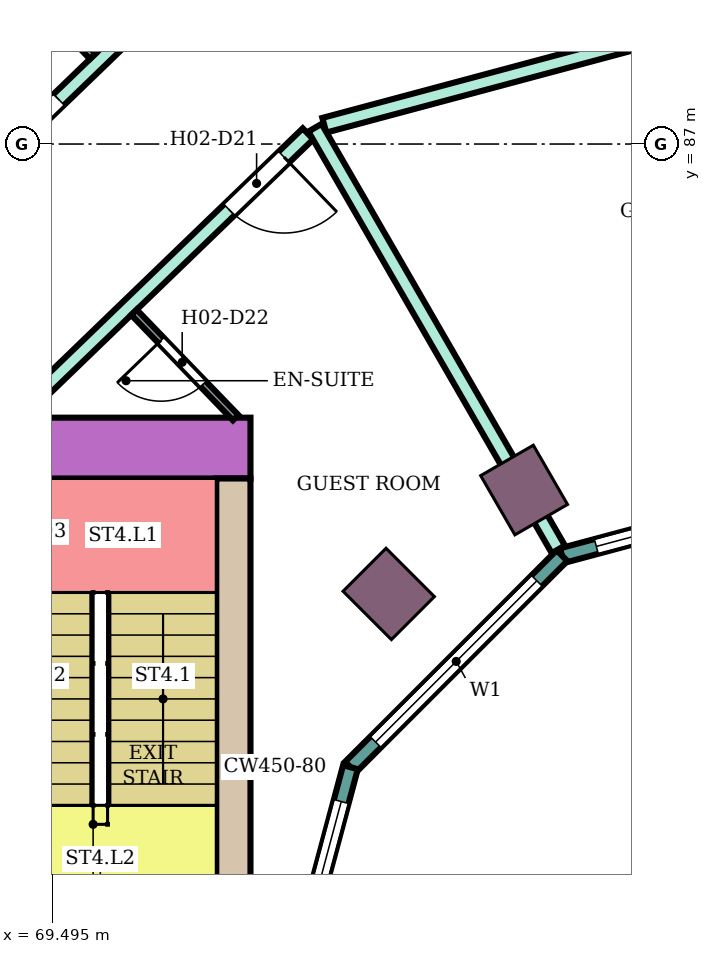
"""IFC4 building model, lengths in metres.
Left out: names, types, materials, properties, quantities, classifications, styles, units other than length and angle.
Written with IfcOpenShell. Run it as: python <this file> out.ifc"""

import sys

from ifc_helpers import new_model, si_unit, direction, frame, frame_2d, origin, origin_2d, place, context, subcontext, project, spatial, rectangle, extrude, element, fill, save


model = new_model("IFC4")
c1 = context("Model", 3, precision=1e-05, world=origin(), true_north=direction((0.0, 1.0)))
c2 = subcontext(c1, "Body", "Model", "MODEL_VIEW")
j1 = project(units=[si_unit("LENGTHUNIT", "METRE"), si_unit("PLANEANGLEUNIT", "RADIAN")], contexts=[c1])
p1 = place(None, origin())
s1 = spatial("IfcSite", under=j1, at=p1, CompositionType="ELEMENT")
p2 = place(p1, origin())
s2 = spatial("IfcBuilding", under=s1, at=p2, CompositionType="ELEMENT")
p3 = place(p2, frame((0.0, 0.0, 40.2)))
s3 = spatial("IfcBuildingStorey", under=s2, at=p3, CompositionType="ELEMENT", Elevation=40.2)
for number, where, z_axis, x_axis in (
    (1, (75.7, 82.448, 0.0), (0.0, 0.0, 1.0), (-0.5, 0.866, 0.0)),
    (2, (73.919, 81.081, 0.0), (0.0, 0.0, 1.0), (-0.707, 0.707, 0.0)),
):
    element("IfcColumn", number, at=place(p3, frame(where, z_axis=z_axis, x_axis=x_axis)), inside=s3, PredefinedType="COLUMN", context=c2, shape_type="SweptSolid", body=[
        extrude(rectangle(XDim=0.9, YDim=0.8, at=origin_2d()), origin(), (0.0, 0.0, 1.0), 3.8),
    ])
p4 = place(p3, frame((72.1, 83.0, 0.0), z_axis=(0.0, 0.0, 1.0), x_axis=(-1.0, 0.0, 0.0)))
e3 = element("IfcWall", 3, at=p4, inside=s3, PredefinedType="SHEAR", context=c2, shape_type="SweptSolid", body=[
    extrude(rectangle(XDim=14.7, YDim=0.8, at=frame_2d((7.35, 0.0))), origin(), (0.0, 0.0, 1.0), 3.48),
])
p5 = place(p4, frame((4.2, 0.0, 0.0)))
e4 = element("IfcOpeningElement", 4, at=p5, cuts=e3, PredefinedType="OPENING", context=c2, shape_type="SweptSolid", body=[
    extrude(rectangle(XDim=2.4, YDim=2.4, at=frame_2d((1.2, 1.2))), frame((0.0, 0.41, 0.0), z_axis=(0.0, -1.0, 0.0), x_axis=(1.0, 0.0, 0.0)), (0.0, 0.0, 1.0), 0.82),
])
p6 = place(p3, frame((71.875, 82.6, 0.0), z_axis=(0.0, 0.0, 1.0), x_axis=(0.0, -1.0, 0.0)))
e5 = element("IfcWall", 5, at=p6, inside=s3, PredefinedType="SHEAR", context=c2, shape_type="SweptSolid", body=[
    extrude(rectangle(XDim=7.6, YDim=0.45, at=frame_2d((3.8, 0.0))), origin(), (0.0, 0.0, 1.0), 3.48),
])
p7 = place(p3, frame((80.0, 82.604, 0.0), z_axis=(0.0, 0.0, 1.0), x_axis=(-0.965933654434, -0.258789828301, 0.0)))
e6 = element("IfcWall", 6, at=p7, inside=s3, PredefinedType="NOTDEFINED", context=c2, shape_type="SweptSolid", body=[
    extrude(rectangle(XDim=3.936, YDim=0.2, at=frame_2d((1.968, 0.0))), origin(), (0.0, 0.0, 1.0), 3.8),
])
p8 = place(p7, frame((0.468, 0.0, 0.9)))
e7 = element("IfcOpeningElement", 7, at=p8, cuts=e6, PredefinedType="OPENING", context=c2, shape_type="SweptSolid", body=[
    extrude(rectangle(XDim=3.0, YDim=2.3, at=frame_2d((1.5, 1.15))), frame((0.0, 0.11, 0.0), z_axis=(0.0, -1.0, 0.0), x_axis=(1.0, 0.0, 0.0)), (0.0, 0.0, 1.0), 0.22),
])
p9 = place(p3, frame((76.198, 81.585, 0.0), z_axis=(0.0, 0.0, 1.0), x_axis=(-0.707106781187, -0.707106781187, 0.0)))
e8 = element("IfcWall", 8, at=p9, inside=s3, PredefinedType="NOTDEFINED", context=c2, shape_type="SweptSolid", body=[
    extrude(rectangle(XDim=3.936, YDim=0.2, at=frame_2d((1.968, 0.0))), origin(), (0.0, 0.0, 1.0), 3.8),
])
p10 = place(p9, frame((0.468, 0.0, 0.9)))
e9 = element("IfcOpeningElement", 9, at=p10, cuts=e8, PredefinedType="OPENING", context=c2, shape_type="SweptSolid", body=[
    extrude(rectangle(XDim=3.0, YDim=2.3, at=frame_2d((1.5, 1.15))), frame((0.0, 0.11, 0.0), z_axis=(0.0, -1.0, 0.0), x_axis=(1.0, 0.0, 0.0)), (0.0, 0.0, 1.0), 0.22),
])
p11 = place(p3, frame((73.415, 78.802, 0.0), z_axis=(0.0, 0.0, 1.0), x_axis=(-0.258789828301, -0.965933654434, 0.0)))
e10 = element("IfcWall", 10, at=p11, inside=s3, PredefinedType="NOTDEFINED", context=c2, shape_type="SweptSolid", body=[
    extrude(rectangle(XDim=3.936, YDim=0.2, at=frame_2d((1.968, 0.0))), origin(), (0.0, 0.0, 1.0), 3.8),
])
p12 = place(p11, frame((0.468, 0.0, 0.9)))
e11 = element("IfcOpeningElement", 11, at=p12, cuts=e10, PredefinedType="OPENING", context=c2, shape_type="SweptSolid", body=[
    extrude(rectangle(XDim=3.0, YDim=2.3, at=frame_2d((1.5, 1.15))), frame((0.0, 0.11, 0.0), z_axis=(0.0, -1.0, 0.0), x_axis=(1.0, 0.0, 0.0)), (0.0, 0.0, 1.0), 0.22),
])
p13 = place(p3, frame((66.796, 84.9, 0.0), z_axis=(0.0, 0.0, 1.0), x_axis=(0.719690131178, 0.694295409092, 0.0)))
e12 = element("IfcWall", 12, at=p13, inside=s3, PredefinedType="PARTITIONING", context=c2, shape_type="SweptSolid", body=[
    extrude(rectangle(XDim=6.585, YDim=0.2, at=frame_2d((3.293, 0.0))), origin(), (0.0, 0.0, 1.0), 3.35),
])
p14 = place(p13, frame((2.867, 0.0, 0.0)))
e13 = element("IfcOpeningElement", 13, at=p14, cuts=e12, PredefinedType="OPENING", context=c2, shape_type="SweptSolid", body=[
    extrude(rectangle(XDim=1.0, YDim=2.1, at=frame_2d((0.5, 1.05))), frame((0.0, 0.11, 0.0), z_axis=(0.0, -1.0, 0.0), x_axis=(1.0, 0.0, 0.0)), (0.0, 0.0, 1.0), 0.22),
])
p15 = place(p3, frame((68.987, 83.4, 0.0), z_axis=(0.0, 0.0, 1.0), x_axis=(0.719591503389, 0.694397629784, 0.0)))
e14 = element("IfcWall", 14, at=p15, inside=s3, PredefinedType="PARTITIONING", context=c2, shape_type="SweptSolid", body=[
    extrude(rectangle(XDim=5.378, YDim=0.2, at=frame_2d((2.689, 0.0))), origin(), (0.0, 0.0, 1.0), 3.35),
])
p16 = place(p15, frame((3.938, 0.0, 0.0)))
e15 = element("IfcOpeningElement", 15, at=p16, cuts=e14, PredefinedType="OPENING", context=c2, shape_type="SweptSolid", body=[
    extrude(rectangle(XDim=1.0, YDim=2.1, at=frame_2d((0.5, 1.05))), frame((0.0, 0.11, 0.0), z_axis=(0.0, -1.0, 0.0), x_axis=(1.0, 0.0, 0.0)), (0.0, 0.0, 1.0), 0.22),
])
p17 = place(p3, frame((73.071, 87.247, 0.0), z_axis=(0.0, 0.0, 1.0), x_axis=(0.965920206274, 0.258840018373, 0.0)))
e16 = element("IfcWall", 16, at=p17, inside=s3, PredefinedType="PARTITIONING", context=c2, shape_type="SweptSolid", body=[
    extrude(rectangle(XDim=7.123, YDim=0.2, at=frame_2d((3.562, 0.0))), origin(), (0.0, 0.0, 1.0), 3.35),
])
p18 = place(p3, frame((72.949, 87.215, 0.0), z_axis=(0.0, 0.0, 1.0), x_axis=(0.499890755261, -0.866088467077, 0.0)))
e17 = element("IfcWall", 17, at=p18, inside=s3, PredefinedType="PARTITIONING", context=c2, shape_type="SweptSolid", body=[
    extrude(rectangle(XDim=6.404, YDim=0.2, at=frame_2d((3.202, 0.0))), origin(), (0.0, 0.0, 1.0), 3.35),
])
p19 = place(p3, frame((68.185, 90.06, 0.0), z_axis=(0.0, 0.0, 1.0), x_axis=(0.69446127412, -0.719530081892, 0.0)))
e18 = element("IfcWall", 18, at=p19, inside=s3, PredefinedType="PARTITIONING", context=c2, shape_type="SweptSolid", body=[
    extrude(rectangle(XDim=2.649, YDim=0.1, at=frame_2d((1.324, 0.0))), origin(), (0.0, 0.0, 1.0), 3.35),
])
p20 = place(p19, frame((0.95, 0.0, 0.0)))
e19 = element("IfcOpeningElement", 19, at=p20, cuts=e18, PredefinedType="OPENING", context=c2, shape_type="SweptSolid", body=[
    extrude(rectangle(XDim=0.8, YDim=2.1, at=frame_2d((0.4, 1.05))), frame((0.0, 0.06, 0.0), z_axis=(0.0, -1.0, 0.0), x_axis=(1.0, 0.0, 0.0)), (0.0, 0.0, 1.0), 0.12),
])
p21 = place(p3, frame((70.567, 84.786, 0.0), z_axis=(0.0, 0.0, 1.0), x_axis=(0.694447472534, -0.719543402368, 0.0)))
e20 = element("IfcWall", 20, at=p21, inside=s3, PredefinedType="PARTITIONING", context=c2, shape_type="SweptSolid", body=[
    extrude(rectangle(XDim=1.926, YDim=0.1, at=frame_2d((0.963, 0.0))), origin(), (0.0, 0.0, 1.0), 3.35),
])
p22 = place(p21, frame((0.513, 0.0, 0.0)))
e21 = element("IfcOpeningElement", 21, at=p22, cuts=e20, PredefinedType="OPENING", context=c2, shape_type="SweptSolid", body=[
    extrude(rectangle(XDim=0.8, YDim=2.1, at=frame_2d((0.4, 1.05))), frame((0.0, 0.06, 0.0), z_axis=(0.0, -1.0, 0.0), x_axis=(1.0, 0.0, 0.0)), (0.0, 0.0, 1.0), 0.12),
])
p23 = place(p8, origin())
e22 = element("IfcWindow", 22, at=p23, inside=s3, PartitioningType="SINGLE_PANEL", PredefinedType="WINDOW", context=c2, shape_type="SweptSolid", body=[
    extrude(rectangle(XDim=3.0, YDim=2.3, at=frame_2d((1.5, 1.15))), frame((0.0, 0.03, 0.0), z_axis=(0.0, -1.0, 0.0), x_axis=(1.0, 0.0, 0.0)), (0.0, 0.0, 1.0), 0.06),
])
fill(e7, e22)
p24 = place(p10, origin())
e23 = element("IfcWindow", 23, at=p24, inside=s3, PartitioningType="SINGLE_PANEL", PredefinedType="WINDOW", context=c2, shape_type="SweptSolid", body=[
    extrude(rectangle(XDim=3.0, YDim=2.3, at=frame_2d((1.5, 1.15))), frame((0.0, 0.03, 0.0), z_axis=(0.0, -1.0, 0.0), x_axis=(1.0, 0.0, 0.0)), (0.0, 0.0, 1.0), 0.06),
])
fill(e9, e23)
p25 = place(p12, origin())
e24 = element("IfcWindow", 24, at=p25, inside=s3, PartitioningType="SINGLE_PANEL", PredefinedType="WINDOW", context=c2, shape_type="SweptSolid", body=[
    extrude(rectangle(XDim=3.0, YDim=2.3, at=frame_2d((1.5, 1.15))), frame((0.0, 0.03, 0.0), z_axis=(0.0, -1.0, 0.0), x_axis=(1.0, 0.0, 0.0)), (0.0, 0.0, 1.0), 0.06),
])
fill(e11, e24)
p26 = place(p14, origin())
e25 = element("IfcDoor", 25, at=p26, inside=s3, OperationType="SINGLE_SWING_LEFT", PredefinedType="DOOR", context=c2, shape_type="SweptSolid", body=[
    extrude(rectangle(XDim=1.0, YDim=2.1, at=frame_2d((0.5, 1.05))), frame((0.0, 0.025, 0.0), z_axis=(0.0, -1.0, 0.0), x_axis=(1.0, 0.0, 0.0)), (0.0, 0.0, 1.0), 0.05),
])
fill(e13, e25)
p27 = place(p16, frame((1.0, 0.0, 0.0), z_axis=(0.0, 0.0, 1.0), x_axis=(-1.0, 0.0, 0.0)))
e26 = element("IfcDoor", 26, at=p27, inside=s3, OperationType="SINGLE_SWING_LEFT", PredefinedType="DOOR", context=c2, shape_type="SweptSolid", body=[
    extrude(rectangle(XDim=1.0, YDim=2.1, at=frame_2d((0.5, 1.05))), frame((0.0, 0.025, 0.0), z_axis=(0.0, -1.0, 0.0), x_axis=(1.0, 0.0, 0.0)), (0.0, 0.0, 1.0), 0.05),
])
fill(e15, e26)
p28 = place(p22, frame((0.8, 0.0, 0.0), z_axis=(0.0, 0.0, 1.0), x_axis=(-1.0, 0.0, 0.0)))
e27 = element("IfcDoor", 27, at=p28, inside=s3, OperationType="SINGLE_SWING_RIGHT", PredefinedType="DOOR", context=c2, shape_type="SweptSolid", body=[
    extrude(rectangle(XDim=0.8, YDim=2.1, at=frame_2d((0.4, 1.05))), frame((0.0, 0.025, 0.0), z_axis=(0.0, -1.0, 0.0), x_axis=(1.0, 0.0, 0.0)), (0.0, 0.0, 1.0), 0.05),
])
fill(e21, e27)
save(model, sys.argv[1])
